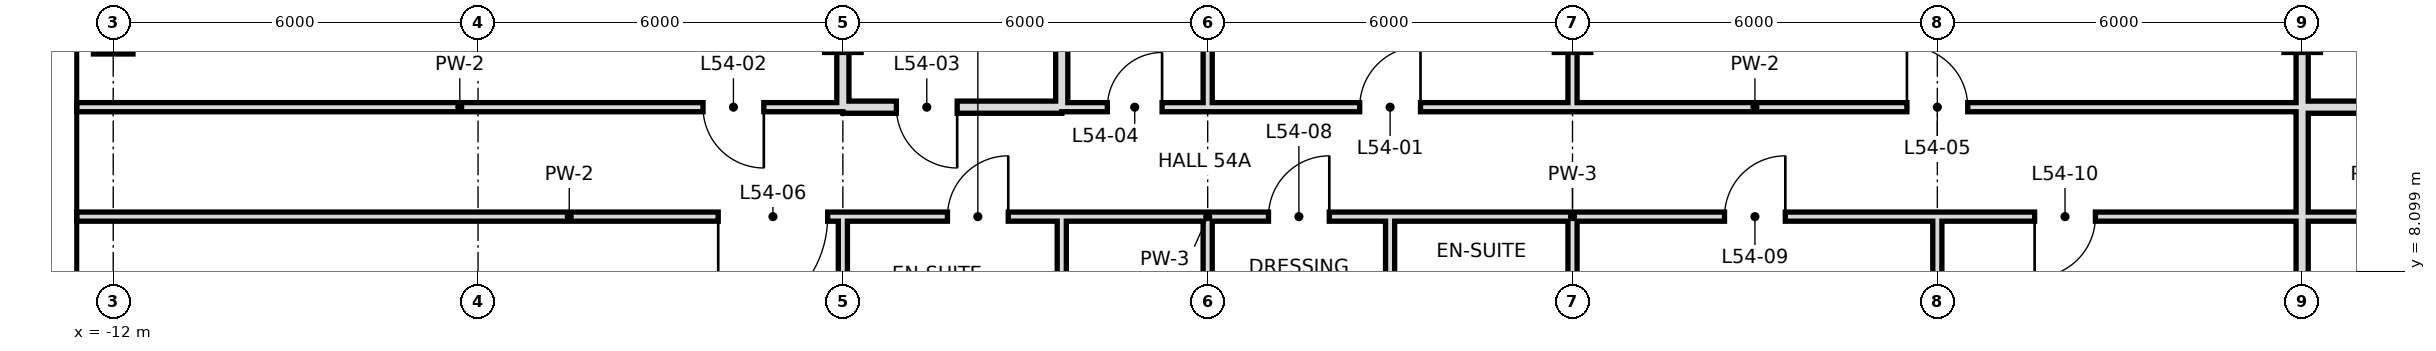
"""IFC4 building model, lengths in metres.
Left out: names, types, materials, properties, quantities, classifications, styles, units other than length and angle.
Written with IfcOpenShell. Run it as: python <this file> out.ifc"""

import sys

from ifc_helpers import new_model, si_unit, direction, frame, frame_2d, origin, origin_2d, place, context, subcontext, project, spatial, rectangle, hollow_rectangle, extrude, element, fill, save


model = new_model("IFC4")
c1 = context("Model", 3, precision=1e-05, world=origin(), true_north=direction((0.0, 1.0)))
c2 = subcontext(c1, "Body", "Model", "MODEL_VIEW")
j1 = project(units=[si_unit("LENGTHUNIT", "METRE"), si_unit("PLANEANGLEUNIT", "RADIAN")], contexts=[c1])
p1 = place(None, origin())
s1 = spatial("IfcSite", under=j1, at=p1, CompositionType="ELEMENT")
p2 = place(p1, origin())
s2 = spatial("IfcBuilding", under=s1, at=p2, CompositionType="ELEMENT")
p3 = place(p2, frame((0.0, 0.0, 229.8)))
s3 = spatial("IfcBuildingStorey", under=s2, at=p3, CompositionType="ELEMENT", Elevation=229.8)
p4 = place(p3, frame((-12.0, 12.0, 0.0), z_axis=(0.0, 0.0, 1.0), x_axis=(1.0, 0.0, 0.0)))
e1 = element("IfcColumn", 1, at=p4, inside=s3, PredefinedType="COLUMN", context=c2, shape_type="SweptSolid", body=[
    extrude(hollow_rectangle(XDim=0.65, YDim=0.65, WallThickness=0.032, at=origin_2d()), origin(), (0.0, 0.0, 1.0), 4.4),
])
p5 = place(p3, frame((0.0, 10.8, 0.0), z_axis=(0.0, 0.0, 1.0), x_axis=(0.0, 1.0, 0.0)))
e2 = element("IfcWall", 2, at=p5, inside=s3, PredefinedType="SOLIDWALL", context=c2, shape_type="SweptSolid", body=[
    extrude(rectangle(XDim=7.2, YDim=0.2, at=frame_2d((3.6, 0.0))), origin(), (0.0, 0.0, 1.0), 3.4),
])
p6 = place(p3, frame((0.0, 0.0, 0.0), z_axis=(0.0, 0.0, 1.0), x_axis=(0.0, 1.0, 0.0)))
e3 = element("IfcWall", 3, at=p6, inside=s3, PredefinedType="PARTITIONING", context=c2, shape_type="SweptSolid", body=[
    extrude(rectangle(XDim=9.0, YDim=0.15, at=frame_2d((4.5, 0.0))), origin(), (0.0, 0.0, 1.0), 3.4),
])
p7 = place(p3, frame((12.0, 10.8, 0.0), z_axis=(0.0, 0.0, 1.0), x_axis=(0.0, 1.0, 0.0)))
e4 = element("IfcWall", 4, at=p7, inside=s3, PredefinedType="PARTITIONING", context=c2, shape_type="SweptSolid", body=[
    extrude(rectangle(XDim=7.9, YDim=0.15, at=frame_2d((3.95, 0.0))), origin(), (0.0, 0.0, 1.0), 3.4),
])
p8 = place(p3, frame((12.0, 6.0, 0.0), z_axis=(0.0, 0.0, 1.0), x_axis=(0.0, 1.0, 0.0)))
e5 = element("IfcWall", 5, at=p8, inside=s3, PredefinedType="PARTITIONING", context=c2, shape_type="SweptSolid", body=[
    extrude(rectangle(XDim=3.0, YDim=0.15, at=frame_2d((1.5, 0.0))), origin(), (0.0, 0.0, 1.0), 3.4),
])
p9 = place(p3, frame((18.0, -0.6, 0.0), z_axis=(0.0, 0.0, 1.0), x_axis=(0.0, 1.0, 0.0)))
e6 = element("IfcWall", 6, at=p9, inside=s3, PredefinedType="PARTITIONING", context=c2, shape_type="SweptSolid", body=[
    extrude(rectangle(XDim=9.6, YDim=0.15, at=frame_2d((4.8, 0.0))), origin(), (0.0, 0.0, 1.0), 3.4),
])
p10 = place(p3, frame((24.0, 10.8, 0.0), z_axis=(0.0, 0.0, 1.0), x_axis=(0.0, 1.0, 0.0)))
e7 = element("IfcWall", 7, at=p10, inside=s3, PredefinedType="SOLIDWALL", context=c2, shape_type="SweptSolid", body=[
    extrude(rectangle(XDim=7.9, YDim=0.2, at=frame_2d((3.95, 0.0))), origin(), (0.0, 0.0, 1.0), 3.4),
])
p11 = place(p3, frame((24.0, 0.0, 0.0), z_axis=(0.0, 0.0, 1.0), x_axis=(0.0, 1.0, 0.0)))
e8 = element("IfcWall", 8, at=p11, inside=s3, PredefinedType="SOLIDWALL", context=c2, shape_type="SweptSolid", body=[
    extrude(rectangle(XDim=10.8, YDim=0.2, at=frame_2d((5.4, 0.0))), origin(), (0.0, 0.0, 1.0), 3.4),
])
p12 = place(p3, frame((3.6, 10.8, 0.0), z_axis=(0.0, 0.0, 1.0), x_axis=(0.0, 1.0, 0.0)))
e9 = element("IfcWall", 9, at=p12, inside=s3, PredefinedType="SOLIDWALL", context=c2, shape_type="SweptSolid", body=[
    extrude(rectangle(XDim=7.9, YDim=0.2, at=frame_2d((3.95, 0.0))), origin(), (0.0, 0.0, 1.0), 3.4),
])
p13 = place(p3, frame((3.6, 6.0, 0.0), z_axis=(0.0, 0.0, 1.0), x_axis=(0.0, 1.0, 0.0)))
e10 = element("IfcWall", 10, at=p13, inside=s3, PredefinedType="PARTITIONING", context=c2, shape_type="SweptSolid", body=[
    extrude(rectangle(XDim=3.0, YDim=0.15, at=frame_2d((1.5, 0.0))), origin(), (0.0, 0.0, 1.0), 4.1),
])
p14 = place(p3, frame((6.0, 6.0, 0.0), z_axis=(0.0, 0.0, 1.0), x_axis=(0.0, 1.0, 0.0)))
e11 = element("IfcWall", 11, at=p14, inside=s3, PredefinedType="PARTITIONING", context=c2, shape_type="SweptSolid", body=[
    extrude(rectangle(XDim=3.0, YDim=0.15, at=frame_2d((1.5, 0.0))), origin(), (0.0, 0.0, 1.0), 3.4),
])
p15 = place(p3, frame((6.0, 10.8, 0.0), z_axis=(0.0, 0.0, 1.0), x_axis=(0.0, 1.0, 0.0)))
e12 = element("IfcWall", 12, at=p15, inside=s3, PredefinedType="PARTITIONING", context=c2, shape_type="SweptSolid", body=[
    extrude(rectangle(XDim=7.9, YDim=0.15, at=frame_2d((3.95, 0.0))), origin(), (0.0, 0.0, 1.0), 3.4),
])
p16 = place(p3, frame((9.0, 6.0, 0.0), z_axis=(0.0, 0.0, 1.0), x_axis=(0.0, 1.0, 0.0)))
e13 = element("IfcWall", 13, at=p16, inside=s3, PredefinedType="PARTITIONING", context=c2, shape_type="SweptSolid", body=[
    extrude(rectangle(XDim=3.0, YDim=0.15, at=frame_2d((1.5, 0.0))), origin(), (0.0, 0.0, 1.0), 4.1),
])
p17 = place(p3, frame((0.0, 10.8, 0.0), z_axis=(0.0, 0.0, 1.0), x_axis=(1.0, 0.0, 0.0)))
e14 = element("IfcWall", 14, at=p17, inside=s3, PredefinedType="SOLIDWALL", context=c2, shape_type="SweptSolid", body=[
    extrude(rectangle(XDim=3.6, YDim=0.2, at=frame_2d((1.8, 0.0))), origin(), (0.0, 0.0, 1.0), 3.4),
])
p18 = place(p17, frame((0.88, 0.0, 0.0)))
e15 = element("IfcOpeningElement", 15, at=p18, cuts=e14, PredefinedType="OPENING", context=c2, shape_type="SweptSolid", body=[
    extrude(rectangle(XDim=1.0, YDim=2.4, at=frame_2d((0.5, 1.2))), frame((0.0, 0.11, 0.0), z_axis=(0.0, -1.0, 0.0), x_axis=(1.0, 0.0, 0.0)), (0.0, 0.0, 1.0), 0.22),
])
p19 = place(p3, frame((24.0, 10.8, 0.0), z_axis=(0.0, 0.0, 1.0), x_axis=(1.0, 0.0, 0.0)))
e16 = element("IfcWall", 16, at=p19, inside=s3, PredefinedType="SOLIDWALL", context=c2, shape_type="SweptSolid", body=[
    extrude(rectangle(XDim=5.4, YDim=0.2, at=frame_2d((2.7, 0.0))), origin(), (0.0, 0.0, 1.0), 3.4),
])
p20 = place(p19, frame((2.98, 0.0, 0.0)))
e17 = element("IfcOpeningElement", 17, at=p20, cuts=e16, PredefinedType="OPENING", context=c2, shape_type="SweptSolid", body=[
    extrude(rectangle(XDim=1.0, YDim=2.4, at=frame_2d((0.5, 1.2))), frame((0.0, 0.11, 0.0), z_axis=(0.0, -1.0, 0.0), x_axis=(1.0, 0.0, 0.0)), (0.0, 0.0, 1.0), 0.22),
])
p21 = place(p3, frame((-12.6, 10.8, 0.0), z_axis=(0.0, 0.0, 1.0), x_axis=(1.0, 0.0, 0.0)))
e18 = element("IfcWall", 18, at=p21, inside=s3, PredefinedType="PARTITIONING", context=c2, shape_type="SweptSolid", body=[
    extrude(rectangle(XDim=12.6, YDim=0.15, at=frame_2d((6.3, 0.0))), origin(), (0.0, 0.0, 1.0), 4.1),
])
p22 = place(p21, frame((10.3, 0.0, 0.0)))
e19 = element("IfcOpeningElement", 19, at=p22, cuts=e18, PredefinedType="OPENING", context=c2, shape_type="SweptSolid", body=[
    extrude(rectangle(XDim=1.0, YDim=2.4, at=frame_2d((0.5, 1.2))), frame((0.0, 0.085, 0.0), z_axis=(0.0, -1.0, 0.0), x_axis=(1.0, 0.0, 0.0)), (0.0, 0.0, 1.0), 0.17),
])
p23 = place(p3, frame((6.0, 10.8, 0.0), z_axis=(0.0, 0.0, 1.0), x_axis=(1.0, 0.0, 0.0)))
e20 = element("IfcWall", 20, at=p23, inside=s3, PredefinedType="PARTITIONING", context=c2, shape_type="SweptSolid", body=[
    extrude(rectangle(XDim=18.0, YDim=0.15, at=frame_2d((9.0, 0.0))), origin(), (0.0, 0.0, 1.0), 4.1),
])
p24 = place(p23, frame((2.5, 0.0, 0.0)))
e21 = element("IfcOpeningElement", 21, at=p24, cuts=e20, PredefinedType="OPENING", context=c2, shape_type="SweptSolid", body=[
    extrude(rectangle(XDim=1.0, YDim=2.4, at=frame_2d((0.5, 1.2))), frame((0.0, 0.085, 0.0), z_axis=(0.0, -1.0, 0.0), x_axis=(1.0, 0.0, 0.0)), (0.0, 0.0, 1.0), 0.17),
])
p25 = place(p23, frame((11.5, 0.0, 0.0)))
e22 = element("IfcOpeningElement", 22, at=p25, cuts=e20, PredefinedType="OPENING", context=c2, shape_type="SweptSolid", body=[
    extrude(rectangle(XDim=1.0, YDim=2.4, at=frame_2d((0.5, 1.2))), frame((0.0, 0.085, 0.0), z_axis=(0.0, -1.0, 0.0), x_axis=(1.0, 0.0, 0.0)), (0.0, 0.0, 1.0), 0.17),
])
p26 = place(p3, frame((3.6, 10.8, 0.0), z_axis=(0.0, 0.0, 1.0), x_axis=(1.0, 0.0, 0.0)))
e23 = element("IfcWall", 23, at=p26, inside=s3, PredefinedType="PARTITIONING", context=c2, shape_type="SweptSolid", body=[
    extrude(rectangle(XDim=2.4, YDim=0.15, at=frame_2d((1.2, 0.0))), origin(), (0.0, 0.0, 1.0), 4.1),
])
p27 = place(p26, frame((0.75, 0.0, 0.0)))
e24 = element("IfcOpeningElement", 24, at=p27, cuts=e23, PredefinedType="OPENING", context=c2, shape_type="SweptSolid", body=[
    extrude(rectangle(XDim=0.9, YDim=2.4, at=frame_2d((0.45, 1.2))), frame((0.0, 0.085, 0.0), z_axis=(0.0, -1.0, 0.0), x_axis=(1.0, 0.0, 0.0)), (0.0, 0.0, 1.0), 0.17),
])
p28 = place(p3, frame((-12.6, 9.0, 0.0), z_axis=(0.0, 0.0, 1.0), x_axis=(1.0, 0.0, 0.0)))
e25 = element("IfcWall", 25, at=p28, inside=s3, PredefinedType="PARTITIONING", context=c2, shape_type="SweptSolid", body=[
    extrude(rectangle(XDim=16.2, YDim=0.15, at=frame_2d((8.1, 0.0))), origin(), (0.0, 0.0, 1.0), 4.1),
])
p29 = place(p28, frame((10.55, 0.0, 0.0)))
e26 = element("IfcOpeningElement", 26, at=p29, cuts=e25, PredefinedType="OPENING", context=c2, shape_type="SweptSolid", body=[
    extrude(rectangle(XDim=1.8, YDim=2.4, at=frame_2d((0.9, 1.2))), frame((0.0, 0.085, 0.0), z_axis=(0.0, -1.0, 0.0), x_axis=(1.0, 0.0, 0.0)), (0.0, 0.0, 1.0), 0.17),
])
p30 = place(p28, frame((14.32, 0.0, 0.0)))
e27 = element("IfcOpeningElement", 27, at=p30, cuts=e25, PredefinedType="OPENING", context=c2, shape_type="SweptSolid", body=[
    extrude(rectangle(XDim=1.0, YDim=2.4, at=frame_2d((0.5, 1.2))), frame((0.0, 0.085, 0.0), z_axis=(0.0, -1.0, 0.0), x_axis=(1.0, 0.0, 0.0)), (0.0, 0.0, 1.0), 0.17),
])
p31 = place(p3, frame((6.0, 9.0, 0.0), z_axis=(0.0, 0.0, 1.0), x_axis=(1.0, 0.0, 0.0)))
e28 = element("IfcWall", 28, at=p31, inside=s3, PredefinedType="PARTITIONING", context=c2, shape_type="SweptSolid", body=[
    extrude(rectangle(XDim=3.0, YDim=0.15, at=frame_2d((1.5, 0.0))), origin(), (0.0, 0.0, 1.0), 4.1),
])
p32 = place(p31, frame((1.0, 0.0, 0.0)))
e29 = element("IfcOpeningElement", 29, at=p32, cuts=e28, PredefinedType="OPENING", context=c2, shape_type="SweptSolid", body=[
    extrude(rectangle(XDim=1.0, YDim=2.4, at=frame_2d((0.5, 1.2))), frame((0.0, 0.085, 0.0), z_axis=(0.0, -1.0, 0.0), x_axis=(1.0, 0.0, 0.0)), (0.0, 0.0, 1.0), 0.17),
])
p33 = place(p3, frame((12.0, 9.0, 0.0), z_axis=(0.0, 0.0, 1.0), x_axis=(1.0, 0.0, 0.0)))
e30 = element("IfcWall", 30, at=p33, inside=s3, PredefinedType="PARTITIONING", context=c2, shape_type="SweptSolid", body=[
    extrude(rectangle(XDim=26.4, YDim=0.15, at=frame_2d((13.2, 0.0))), origin(), (0.0, 0.0, 1.0), 4.1),
])
p34 = place(p33, frame((2.5, 0.0, 0.0)))
e31 = element("IfcOpeningElement", 31, at=p34, cuts=e30, PredefinedType="OPENING", context=c2, shape_type="SweptSolid", body=[
    extrude(rectangle(XDim=1.0, YDim=2.4, at=frame_2d((0.5, 1.2))), frame((0.0, 0.085, 0.0), z_axis=(0.0, -1.0, 0.0), x_axis=(1.0, 0.0, 0.0)), (0.0, 0.0, 1.0), 0.17),
])
p35 = place(p33, frame((7.6, 0.0, 0.0)))
e32 = element("IfcOpeningElement", 32, at=p35, cuts=e30, PredefinedType="OPENING", context=c2, shape_type="SweptSolid", body=[
    extrude(rectangle(XDim=1.0, YDim=2.4, at=frame_2d((0.5, 1.2))), frame((0.0, 0.085, 0.0), z_axis=(0.0, -1.0, 0.0), x_axis=(1.0, 0.0, 0.0)), (0.0, 0.0, 1.0), 0.17),
])
p36 = place(p33, frame((17.1, 0.0, 0.0)))
e33 = element("IfcOpeningElement", 33, at=p36, cuts=e30, PredefinedType="OPENING", context=c2, shape_type="SweptSolid", body=[
    extrude(rectangle(XDim=1.8, YDim=2.4, at=frame_2d((0.9, 1.2))), frame((0.0, 0.085, 0.0), z_axis=(0.0, -1.0, 0.0), x_axis=(1.0, 0.0, 0.0)), (0.0, 0.0, 1.0), 0.17),
])
p37 = place(p33, frame((24.88, 0.0, 0.0)))
e34 = element("IfcOpeningElement", 34, at=p37, cuts=e30, PredefinedType="OPENING", context=c2, shape_type="SweptSolid", body=[
    extrude(rectangle(XDim=1.0, YDim=2.4, at=frame_2d((0.5, 1.2))), frame((0.0, 0.085, 0.0), z_axis=(0.0, -1.0, 0.0), x_axis=(1.0, 0.0, 0.0)), (0.0, 0.0, 1.0), 0.17),
])
p38 = place(p3, frame((3.6, 9.0, 0.0), z_axis=(0.0, 0.0, 1.0), x_axis=(1.0, 0.0, 0.0)))
e35 = element("IfcWall", 35, at=p38, inside=s3, PredefinedType="PARTITIONING", context=c2, shape_type="SweptSolid", body=[
    extrude(rectangle(XDim=2.4, YDim=0.15, at=frame_2d((1.2, 0.0))), origin(), (0.0, 0.0, 1.0), 4.1),
])
p39 = place(p3, frame((9.0, 9.0, 0.0), z_axis=(0.0, 0.0, 1.0), x_axis=(1.0, 0.0, 0.0)))
e36 = element("IfcWall", 36, at=p39, inside=s3, PredefinedType="PARTITIONING", context=c2, shape_type="SweptSolid", body=[
    extrude(rectangle(XDim=3.0, YDim=0.15, at=frame_2d((1.5, 0.0))), origin(), (0.0, 0.0, 1.0), 4.1),
])
p40 = place(p24, frame((1.0, 0.0, 0.0), z_axis=(0.0, 0.0, 1.0), x_axis=(-1.0, 0.0, 0.0)))
e37 = element("IfcDoor", 37, at=p40, inside=s3, OperationType="SINGLE_SWING_LEFT", PredefinedType="DOOR", context=c2, shape_type="SweptSolid", body=[
    extrude(rectangle(XDim=1.0, YDim=2.4, at=frame_2d((0.5, 1.2))), frame((0.0, 0.025, 0.0), z_axis=(0.0, -1.0, 0.0), x_axis=(1.0, 0.0, 0.0)), (0.0, 0.0, 1.0), 0.05),
])
fill(e21, e37)
p41 = place(p22, origin())
e38 = element("IfcDoor", 38, at=p41, inside=s3, OperationType="SINGLE_SWING_RIGHT", PredefinedType="DOOR", context=c2, shape_type="SweptSolid", body=[
    extrude(rectangle(XDim=1.0, YDim=2.4, at=frame_2d((0.5, 1.2))), frame((0.0, 0.025, 0.0), z_axis=(0.0, -1.0, 0.0), x_axis=(1.0, 0.0, 0.0)), (0.0, 0.0, 1.0), 0.05),
])
fill(e19, e38)
p42 = place(p18, origin())
e39 = element("IfcDoor", 39, at=p42, inside=s3, OperationType="SINGLE_SWING_RIGHT", PredefinedType="DOOR", context=c2, shape_type="SweptSolid", body=[
    extrude(rectangle(XDim=1.0, YDim=2.4, at=frame_2d((0.5, 1.2))), frame((0.0, 0.025, 0.0), z_axis=(0.0, -1.0, 0.0), x_axis=(1.0, 0.0, 0.0)), (0.0, 0.0, 1.0), 0.05),
])
fill(e15, e39)
p43 = place(p27, frame((0.9, 0.0, 0.0), z_axis=(0.0, 0.0, 1.0), x_axis=(-1.0, 0.0, 0.0)))
e40 = element("IfcDoor", 40, at=p43, inside=s3, OperationType="SINGLE_SWING_LEFT", PredefinedType="DOOR", context=c2, shape_type="SweptSolid", body=[
    extrude(rectangle(XDim=0.9, YDim=2.4, at=frame_2d((0.45, 1.2))), frame((0.0, 0.025, 0.0), z_axis=(0.0, -1.0, 0.0), x_axis=(1.0, 0.0, 0.0)), (0.0, 0.0, 1.0), 0.05),
])
fill(e24, e40)
p44 = place(p25, origin())
e41 = element("IfcDoor", 41, at=p44, inside=s3, OperationType="SINGLE_SWING_LEFT", PredefinedType="DOOR", context=c2, shape_type="SweptSolid", body=[
    extrude(rectangle(XDim=1.0, YDim=2.4, at=frame_2d((0.5, 1.2))), frame((0.0, 0.025, 0.0), z_axis=(0.0, -1.0, 0.0), x_axis=(1.0, 0.0, 0.0)), (0.0, 0.0, 1.0), 0.05),
])
fill(e22, e41)
p45 = place(p29, frame((1.8, 0.0, 0.0), z_axis=(0.0, 0.0, 1.0), x_axis=(-1.0, 0.0, 0.0)))
e42 = element("IfcDoor", 42, at=p45, inside=s3, OperationType="SINGLE_SWING_RIGHT", PredefinedType="DOOR", context=c2, shape_type="SweptSolid", body=[
    extrude(rectangle(XDim=1.8, YDim=2.4, at=frame_2d((0.9, 1.2))), frame((0.0, 0.025, 0.0), z_axis=(0.0, -1.0, 0.0), x_axis=(1.0, 0.0, 0.0)), (0.0, 0.0, 1.0), 0.05),
])
fill(e26, e42)
p46 = place(p30, frame((1.0, 0.0, 0.0), z_axis=(0.0, 0.0, 1.0), x_axis=(-1.0, 0.0, 0.0)))
e43 = element("IfcDoor", 43, at=p46, inside=s3, OperationType="SINGLE_SWING_LEFT", PredefinedType="DOOR", context=c2, shape_type="SweptSolid", body=[
    extrude(rectangle(XDim=1.0, YDim=2.4, at=frame_2d((0.5, 1.2))), frame((0.0, 0.025, 0.0), z_axis=(0.0, -1.0, 0.0), x_axis=(1.0, 0.0, 0.0)), (0.0, 0.0, 1.0), 0.05),
])
fill(e27, e43)
p47 = place(p32, frame((1.0, 0.0, 0.0), z_axis=(0.0, 0.0, 1.0), x_axis=(-1.0, 0.0, 0.0)))
e44 = element("IfcDoor", 44, at=p47, inside=s3, OperationType="SINGLE_SWING_LEFT", PredefinedType="DOOR", context=c2, shape_type="SweptSolid", body=[
    extrude(rectangle(XDim=1.0, YDim=2.4, at=frame_2d((0.5, 1.2))), frame((0.0, 0.025, 0.0), z_axis=(0.0, -1.0, 0.0), x_axis=(1.0, 0.0, 0.0)), (0.0, 0.0, 1.0), 0.05),
])
fill(e29, e44)
p48 = place(p34, frame((1.0, 0.0, 0.0), z_axis=(0.0, 0.0, 1.0), x_axis=(-1.0, 0.0, 0.0)))
e45 = element("IfcDoor", 45, at=p48, inside=s3, OperationType="SINGLE_SWING_LEFT", PredefinedType="DOOR", context=c2, shape_type="SweptSolid", body=[
    extrude(rectangle(XDim=1.0, YDim=2.4, at=frame_2d((0.5, 1.2))), frame((0.0, 0.025, 0.0), z_axis=(0.0, -1.0, 0.0), x_axis=(1.0, 0.0, 0.0)), (0.0, 0.0, 1.0), 0.05),
])
fill(e31, e45)
p49 = place(p35, frame((1.0, 0.0, 0.0), z_axis=(0.0, 0.0, 1.0), x_axis=(-1.0, 0.0, 0.0)))
e46 = element("IfcDoor", 46, at=p49, inside=s3, OperationType="SINGLE_SWING_RIGHT", PredefinedType="DOOR", context=c2, shape_type="SweptSolid", body=[
    extrude(rectangle(XDim=1.0, YDim=2.4, at=frame_2d((0.5, 1.2))), frame((0.0, 0.025, 0.0), z_axis=(0.0, -1.0, 0.0), x_axis=(1.0, 0.0, 0.0)), (0.0, 0.0, 1.0), 0.05),
])
fill(e32, e46)
save(model, sys.argv[1])
